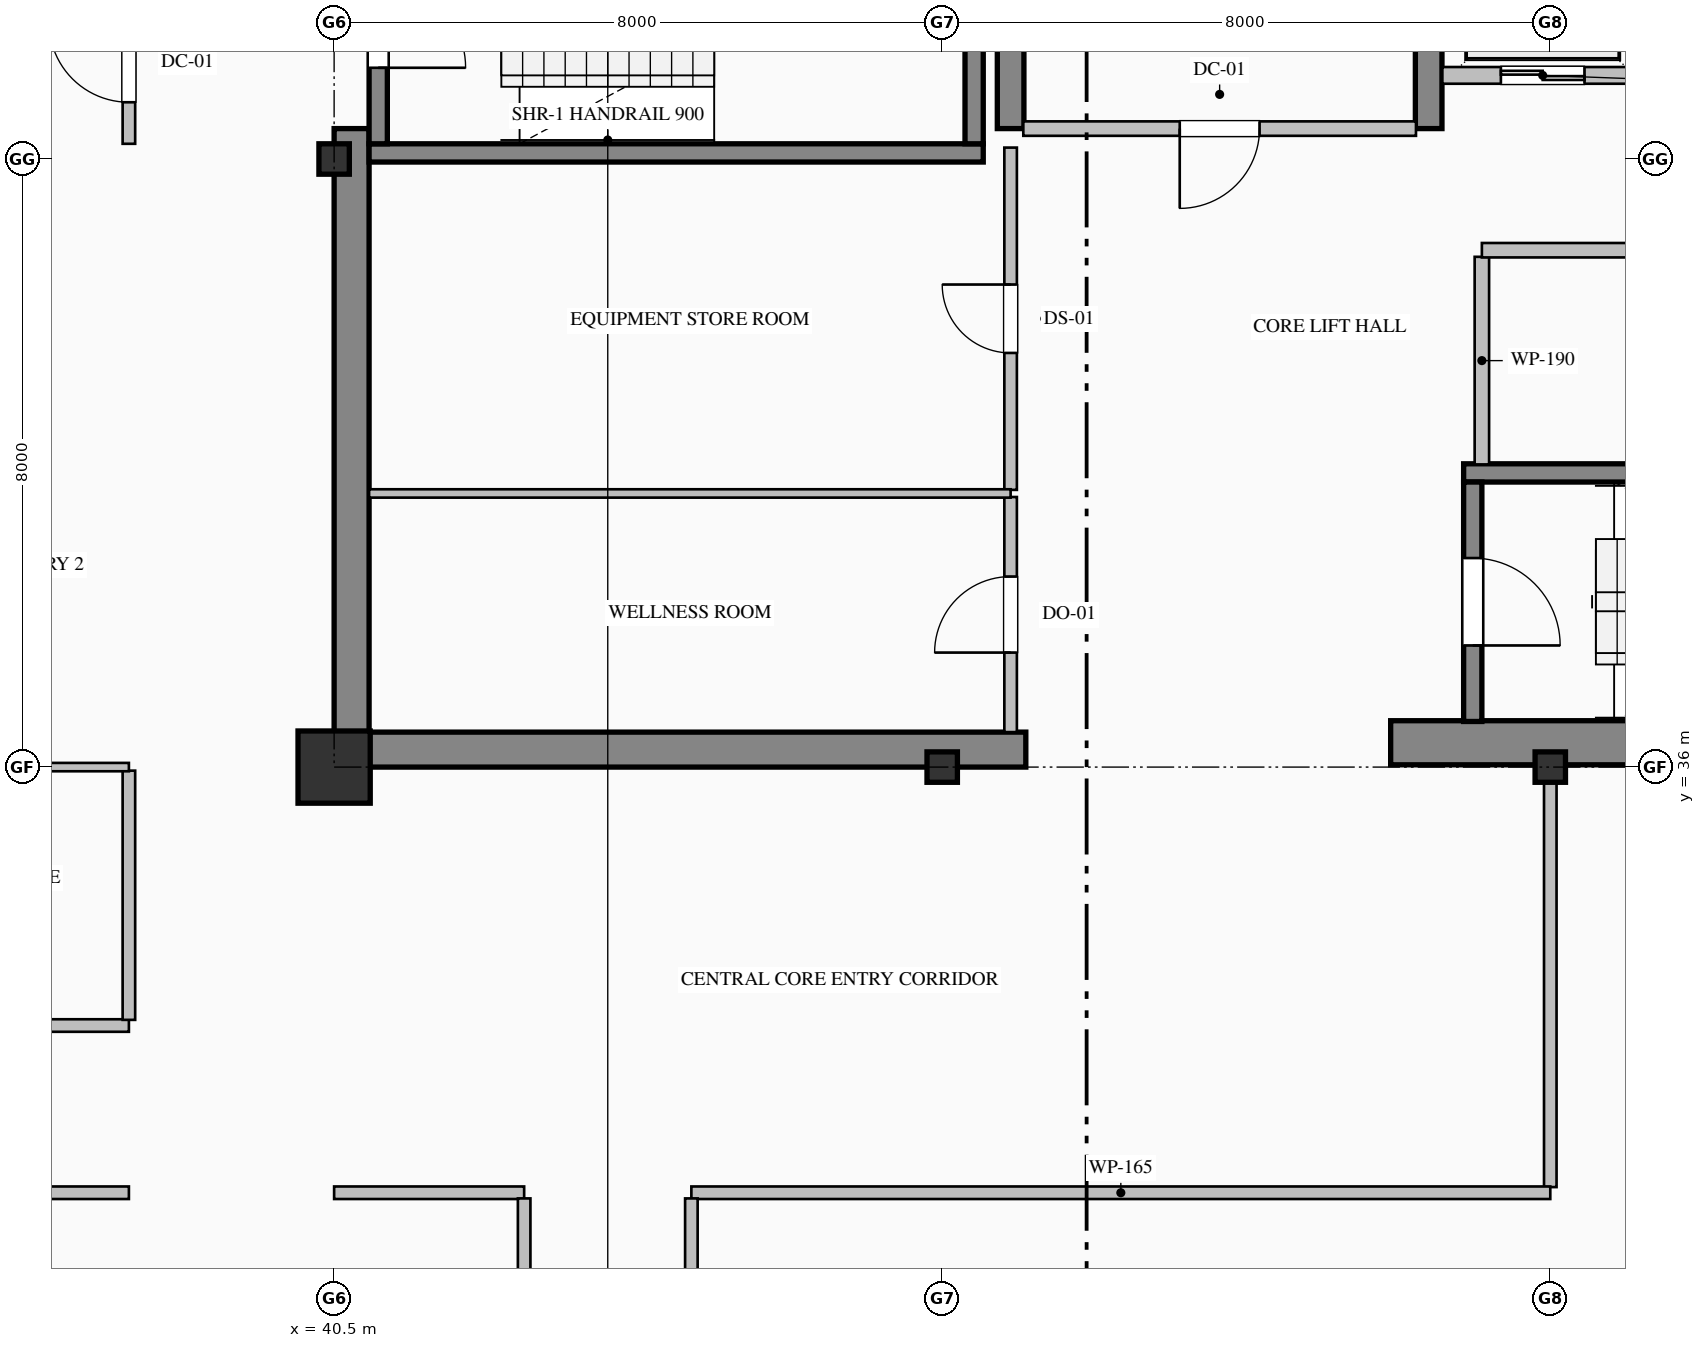
"""IFC4 building model, lengths in metres.
Left out: names, types, materials, properties, quantities, classifications, styles, units other than length and angle.
Written with IfcOpenShell. Run it as: python <this file> out.ifc"""

import sys

from ifc_helpers import new_model, si_unit, direction, frame, frame_2d, origin, origin_2d, place, context, subcontext, project, spatial, rectangle, hollow_rectangle, i_section, extrude, element, fill, save


model = new_model("IFC4")
c1 = context("Model", 3, precision=1e-05, world=origin(), true_north=direction((0.0, 1.0)))
c2 = subcontext(c1, "Body", "Model", "MODEL_VIEW")
j1 = project(units=[si_unit("LENGTHUNIT", "METRE"), si_unit("PLANEANGLEUNIT", "RADIAN")], contexts=[c1])
p1 = place(None, origin())
s1 = spatial("IfcSite", under=j1, at=p1, CompositionType="ELEMENT")
p2 = place(p1, origin())
s2 = spatial("IfcBuilding", under=s1, at=p2, CompositionType="ELEMENT")
p3 = place(p2, frame((0.0, 0.0, 221.8)))
s3 = spatial("IfcBuildingStorey", under=s2, at=p3, CompositionType="ELEMENT", Elevation=221.8)
p4 = place(p3, frame((40.73, 36.46, 0.0), z_axis=(0.0, 0.0, 1.0), x_axis=(0.0, 1.0, 0.0)))
e1 = element("IfcWall", 1, at=p4, inside=s3, PredefinedType="SHEAR", context=c2, shape_type="SweptSolid", body=[
    extrude(rectangle(XDim=7.94, YDim=0.46, at=frame_2d((3.97, 0.0))), origin(), (0.0, 0.0, 1.0), 3.775),
])
p5 = place(p3, frame((40.5, 36.23, 0.0), z_axis=(0.0, 0.0, 1.0), x_axis=(1.0, 0.0, 0.0)))
e2 = element("IfcWall", 2, at=p5, inside=s3, PredefinedType="SHEAR", context=c2, shape_type="SweptSolid", body=[
    extrude(rectangle(XDim=9.1, YDim=0.46, at=frame_2d((4.55, 0.0))), origin(), (0.0, 0.0, 1.0), 3.775),
])
p6 = place(p3, frame((54.4, 36.32, 0.0), z_axis=(0.0, 0.0, 1.0), x_axis=(1.0, 0.0, 0.0)))
e3 = element("IfcWall", 3, at=p6, inside=s3, PredefinedType="SHEAR", context=c2, shape_type="SweptSolid", body=[
    extrude(rectangle(XDim=9.6, YDim=0.58, at=frame_2d((4.8, 0.0))), origin(), (0.0, 0.0, 1.0), 4.0),
])
p7 = place(p3, frame((49.4, 44.4, 0.0), z_axis=(0.0, 0.0, 1.0), x_axis=(0.0, 1.0, 0.0)))
e4 = element("IfcWall", 4, at=p7, inside=s3, PredefinedType="SHEAR", context=c2, shape_type="SweptSolid", body=[
    extrude(rectangle(XDim=3.0, YDim=0.35, at=frame_2d((1.5, 0.0))), origin(), (0.0, 0.0, 1.0), 3.775),
])
p8 = place(p3, frame((54.9, 44.4, 0.0), z_axis=(0.0, 0.0, 1.0), x_axis=(0.0, 1.0, 0.0)))
e5 = element("IfcWall", 5, at=p8, inside=s3, PredefinedType="SHEAR", context=c2, shape_type="SweptSolid", body=[
    extrude(rectangle(XDim=7.14, YDim=0.35, at=frame_2d((3.57, 0.0))), origin(), (0.0, 0.0, 1.0), 3.775),
])
p9 = place(p3, frame((40.5, 36.0, 0.0), z_axis=(0.0, 0.0, 1.0), x_axis=(1.0, 0.0, 0.0)))
e6 = element("IfcColumn", 6, at=p9, inside=s3, PredefinedType="COLUMN", context=c2, shape_type="SweptSolid", body=[
    extrude(hollow_rectangle(XDim=0.95, YDim=0.95, WallThickness=0.036, at=origin_2d()), origin(), (0.0, 0.0, 1.0), 4.0),
])
for number, where, z_axis, x_axis in (
    (7, (40.5, 44.0, 0.0), (0.0, 0.0, 1.0), (1.0, 0.0, 0.0)),
    (8, (48.5, 36.0, 0.0), (0.0, 0.0, 1.0), (1.0, 0.0, 0.0)),
    (9, (56.5, 36.0, 0.0), (0.0, 0.0, 1.0), (1.0, 0.0, 0.0)),
):
    element("IfcColumn", number, at=place(p3, frame(where, z_axis=z_axis, x_axis=x_axis)), inside=s3, PredefinedType="COLUMN", context=c2, shape_type="SweptSolid", body=[
        extrude(i_section(OverallWidth=0.4, OverallDepth=0.4, WebThickness=0.013, FlangeThickness=0.021, FilletRadius=0.022, at=origin_2d()), origin(), (0.0, 0.0, 1.0), 4.0),
    ])
p10 = place(p3, frame((49.04, 44.08, 0.0), z_axis=(0.0, 0.0, 1.0), x_axis=(-1.0, 0.0, 0.0)))
e10 = element("IfcWall", 10, at=p10, inside=s3, PredefinedType="SOLIDWALL", context=c2, shape_type="SweptSolid", body=[
    extrude(rectangle(XDim=8.08, YDim=0.24, at=frame_2d((4.04, 0.0))), origin(), (0.0, 0.0, 1.0), 4.0),
])
p11 = place(p3, frame((41.08, 47.35, 0.0), z_axis=(0.0, 0.0, 1.0), x_axis=(0.0, -1.0, 0.0)))
e11 = element("IfcWall", 11, at=p11, inside=s3, PredefinedType="SOLIDWALL", context=c2, shape_type="SweptSolid", body=[
    extrude(rectangle(XDim=3.15, YDim=0.24, at=frame_2d((1.575, 0.0))), origin(), (0.0, 0.0, 1.0), 4.0),
])
p12 = place(p11, frame((1.0, 0.0, 0.0)))
e12 = element("IfcOpeningElement", 12, at=p12, cuts=e11, PredefinedType="OPENING", context=c2, shape_type="SweptSolid", body=[
    extrude(rectangle(XDim=1.15, YDim=2.2, at=frame_2d((0.575, 1.1))), frame((0.0, 0.13, 0.0), z_axis=(0.0, -1.0, 0.0), x_axis=(1.0, 0.0, 0.0)), (0.0, 0.0, 1.0), 0.26),
])
p13 = place(p3, frame((48.92, 44.2, 0.0), z_axis=(0.0, 0.0, 1.0), x_axis=(0.0, 1.0, 0.0)))
e13 = element("IfcWall", 13, at=p13, inside=s3, PredefinedType="SOLIDWALL", context=c2, shape_type="SweptSolid", body=[
    extrude(rectangle(XDim=3.15, YDim=0.24, at=frame_2d((1.575, 0.0))), origin(), (0.0, 0.0, 1.0), 4.0),
])
p14 = place(p3, frame((55.36, 39.87, 0.0), z_axis=(0.0, 0.0, 1.0), x_axis=(1.0, 0.0, 0.0)))
e14 = element("IfcWall", 14, at=p14, inside=s3, PredefinedType="SOLIDWALL", context=c2, shape_type="SweptSolid", body=[
    extrude(rectangle(XDim=8.08, YDim=0.24, at=frame_2d((4.04, 0.0))), origin(), (0.0, 0.0, 1.0), 4.0),
])
p15 = place(p3, frame((55.48, 39.75, 0.0), z_axis=(0.0, 0.0, 1.0), x_axis=(0.0, -1.0, 0.0)))
e15 = element("IfcWall", 15, at=p15, inside=s3, PredefinedType="SOLIDWALL", context=c2, shape_type="SweptSolid", body=[
    extrude(rectangle(XDim=3.15, YDim=0.24, at=frame_2d((1.575, 0.0))), origin(), (0.0, 0.0, 1.0), 4.0),
])
p16 = place(p15, frame((1.0, 0.0, 0.0)))
e16 = element("IfcOpeningElement", 16, at=p16, cuts=e15, PredefinedType="OPENING", context=c2, shape_type="SweptSolid", body=[
    extrude(rectangle(XDim=1.15, YDim=2.2, at=frame_2d((0.575, 1.1))), frame((0.0, 0.13, 0.0), z_axis=(0.0, -1.0, 0.0), x_axis=(1.0, 0.0, 0.0)), (0.0, 0.0, 1.0), 0.26),
])
p17 = place(p3, frame((63.32, 45.1, 0.0), z_axis=(0.0, 0.0, 1.0), x_axis=(-1.0, 0.0, 0.0)))
e17 = element("IfcWall", 17, at=p17, inside=s3, PredefinedType="PARTITIONING", context=c2, shape_type="SweptSolid", body=[
    extrude(rectangle(XDim=8.24, YDim=0.22, at=frame_2d((4.12, 0.0))), origin(), (0.0, 0.0, 1.0), 3.775),
])
p18 = place(p17, frame((6.37, 0.0, 0.0)))
e18 = element("IfcOpeningElement", 18, at=p18, cuts=e17, PredefinedType="OPENING", context=c2, shape_type="SweptSolid", body=[
    extrude(rectangle(XDim=1.1, YDim=2.2, at=frame_2d((0.55, 1.1))), frame((0.0, 0.12, 0.0), z_axis=(0.0, -1.0, 0.0), x_axis=(1.0, 0.0, 0.0)), (0.0, 0.0, 1.0), 0.24),
])
p19 = place(p17, frame((3.57, 0.0, 0.0)))
e19 = element("IfcOpeningElement", 19, at=p19, cuts=e17, PredefinedType="OPENING", context=c2, shape_type="SweptSolid", body=[
    extrude(rectangle(XDim=1.1, YDim=2.2, at=frame_2d((0.55, 1.1))), frame((0.0, 0.12, 0.0), z_axis=(0.0, -1.0, 0.0), x_axis=(1.0, 0.0, 0.0)), (0.0, 0.0, 1.0), 0.24),
])
p20 = place(p17, frame((0.77, 0.0, 0.0)))
e20 = element("IfcOpeningElement", 20, at=p20, cuts=e17, PredefinedType="OPENING", context=c2, shape_type="SweptSolid", body=[
    extrude(rectangle(XDim=1.1, YDim=2.2, at=frame_2d((0.55, 1.1))), frame((0.0, 0.12, 0.0), z_axis=(0.0, -1.0, 0.0), x_axis=(1.0, 0.0, 0.0)), (0.0, 0.0, 1.0), 0.24),
])
p21 = place(p3, frame((37.8, 44.2, 0.0), z_axis=(0.0, 0.0, 1.0), x_axis=(0.0, 1.0, 0.0)))
e21 = element("IfcWall", 21, at=p21, inside=s3, PredefinedType="PARTITIONING", context=c2, shape_type="SweptSolid", body=[
    extrude(rectangle(XDim=2.143, YDim=0.165, at=frame_2d((1.072, 0.0))), origin(), (0.0, 0.0, 1.0), 3.775),
])
p22 = place(p21, frame((0.546, 0.0, 0.0)))
e22 = element("IfcOpeningElement", 22, at=p22, cuts=e21, PredefinedType="OPENING", context=c2, shape_type="SweptSolid", body=[
    extrude(rectangle(XDim=1.05, YDim=2.15, at=frame_2d((0.525, 1.075))), frame((0.0, 0.093, 0.0), z_axis=(0.0, -1.0, 0.0), x_axis=(1.0, 0.0, 0.0)), (0.0, 0.0, 1.0), 0.185),
])
p23 = place(p3, frame((54.733, 44.4, 0.0), z_axis=(0.0, 0.0, 1.0), x_axis=(-1.0, 0.0, 0.0)))
e23 = element("IfcWall", 23, at=p23, inside=s3, PredefinedType="PARTITIONING", context=c2, shape_type="SweptSolid", body=[
    extrude(rectangle(XDim=5.166, YDim=0.19, at=frame_2d((2.583, 0.0))), origin(), (0.0, 0.0, 1.0), 3.775),
])
p24 = place(p23, frame((2.058, 0.0, 0.0)))
e24 = element("IfcOpeningElement", 24, at=p24, cuts=e23, PredefinedType="OPENING", context=c2, shape_type="SweptSolid", body=[
    extrude(rectangle(XDim=1.05, YDim=2.15, at=frame_2d((0.525, 1.075))), frame((0.0, 0.105, 0.0), z_axis=(0.0, -1.0, 0.0), x_axis=(1.0, 0.0, 0.0)), (0.0, 0.0, 1.0), 0.21),
])
p25 = place(p3, frame((49.4, 36.46, 0.0), z_axis=(0.0, 0.0, 1.0), x_axis=(0.0, 1.0, 0.0)))
e25 = element("IfcWall", 25, at=p25, inside=s3, PredefinedType="PARTITIONING", context=c2, shape_type="SweptSolid", body=[
    extrude(rectangle(XDim=3.093, YDim=0.165, at=frame_2d((1.546, 0.0))), origin(), (0.0, 0.0, 1.0), 3.017),
])
p26 = place(p25, frame((1.046, 0.0, 0.0)))
e26 = element("IfcOpeningElement", 26, at=p26, cuts=e25, PredefinedType="OPENING", context=c2, shape_type="SweptSolid", body=[
    extrude(rectangle(XDim=1.0, YDim=2.15, at=frame_2d((0.5, 1.075))), frame((0.0, 0.093, 0.0), z_axis=(0.0, -1.0, 0.0), x_axis=(1.0, 0.0, 0.0)), (0.0, 0.0, 1.0), 0.185),
])
p27 = place(p3, frame((49.4, 39.647, 0.0), z_axis=(0.0, 0.0, 1.0), x_axis=(0.0, 1.0, 0.0)))
e27 = element("IfcWall", 27, at=p27, inside=s3, PredefinedType="PARTITIONING", context=c2, shape_type="SweptSolid", body=[
    extrude(rectangle(XDim=4.503, YDim=0.165, at=frame_2d((2.251, 0.0))), origin(), (0.0, 0.0, 1.0), 3.017),
])
p28 = place(p27, frame((1.802, 0.0, 0.0)))
e28 = element("IfcOpeningElement", 28, at=p28, cuts=e27, PredefinedType="OPENING", context=c2, shape_type="SweptSolid", body=[
    extrude(rectangle(XDim=0.9, YDim=2.15, at=frame_2d((0.45, 1.075))), frame((0.0, 0.093, 0.0), z_axis=(0.0, -1.0, 0.0), x_axis=(1.0, 0.0, 0.0)), (0.0, 0.0, 1.0), 0.185),
])
p29 = place(p3, frame((55.6, 42.713, 0.0), z_axis=(0.0, 0.0, 1.0), x_axis=(0.0, -1.0, 0.0)))
e29 = element("IfcWall", 29, at=p29, inside=s3, PredefinedType="PARTITIONING", context=c2, shape_type="SweptSolid", body=[
    extrude(rectangle(XDim=2.731, YDim=0.19, at=frame_2d((1.365, 0.0))), origin(), (0.0, 0.0, 1.0), 3.775),
])
p30 = place(p3, frame((40.96, 39.6, 0.0), z_axis=(0.0, 0.0, 1.0), x_axis=(1.0, 0.0, 0.0)))
e30 = element("IfcWall", 30, at=p30, inside=s3, PredefinedType="MOVABLE", context=c2, shape_type="SweptSolid", body=[
    extrude(rectangle(XDim=8.44, YDim=0.11, at=frame_2d((4.22, 0.0))), origin(), (0.0, 0.0, 1.0), 3.775),
])
p31 = place(p3, frame((63.54, 42.8, 0.0), z_axis=(0.0, 0.0, 1.0), x_axis=(-1.0, 0.0, 0.0)))
e31 = element("IfcWall", 31, at=p31, inside=s3, PredefinedType="PARTITIONING", context=c2, shape_type="SweptSolid", body=[
    extrude(rectangle(XDim=7.94, YDim=0.19, at=frame_2d((3.97, 0.0))), origin(), (0.0, 0.0, 1.0), 3.775),
])
p32 = place(p31, frame((3.27, 0.0, 0.0)))
e32 = element("IfcOpeningElement", 32, at=p32, cuts=e31, PredefinedType="OPENING", context=c2, shape_type="SweptSolid", body=[
    extrude(rectangle(XDim=1.4, YDim=2.25, at=frame_2d((0.7, 1.125))), frame((0.0, 0.105, 0.0), z_axis=(0.0, -1.0, 0.0), x_axis=(1.0, 0.0, 0.0)), (0.0, 0.0, 1.0), 0.21),
])
p33 = place(p3, frame((37.8, 30.4, 0.0), z_axis=(0.0, 0.0, 1.0), x_axis=(-1.0, 0.0, 0.0)))
e33 = element("IfcWall", 33, at=p33, inside=s3, PredefinedType="PARTITIONING", context=c2, shape_type="SweptSolid", body=[
    extrude(rectangle(XDim=21.3, YDim=0.165, at=frame_2d((10.65, 0.0))), origin(), (0.0, 0.0, 1.0), 3.775),
])
p34 = place(p33, frame((10.15, 0.0, 0.0)))
e34 = element("IfcOpeningElement", 34, at=p34, cuts=e33, PredefinedType="OPENING", context=c2, shape_type="SweptSolid", body=[
    extrude(rectangle(XDim=1.0, YDim=2.15, at=frame_2d((0.5, 1.075))), frame((0.0, 0.093, 0.0), z_axis=(0.0, -1.0, 0.0), x_axis=(1.0, 0.0, 0.0)), (0.0, 0.0, 1.0), 0.185),
])
p35 = place(p3, frame((29.6, 32.6, 0.0), z_axis=(0.0, 0.0, 1.0), x_axis=(1.0, 0.0, 0.0)))
e35 = element("IfcWall", 35, at=p35, inside=s3, PredefinedType="PARTITIONING", context=c2, shape_type="SweptSolid", body=[
    extrude(rectangle(XDim=8.2, YDim=0.165, at=frame_2d((4.1, 0.0))), origin(), (0.0, 0.0, 1.0), 3.775),
])
p36 = place(p35, frame((3.6, 0.0, 0.0)))
e36 = element("IfcOpeningElement", 36, at=p36, cuts=e35, PredefinedType="OPENING", context=c2, shape_type="SweptSolid", body=[
    extrude(rectangle(XDim=1.0, YDim=2.15, at=frame_2d((0.5, 1.075))), frame((0.0, 0.093, 0.0), z_axis=(0.0, -1.0, 0.0), x_axis=(1.0, 0.0, 0.0)), (0.0, 0.0, 1.0), 0.185),
])
p37 = place(p3, frame((56.5, 36.0, 0.0), z_axis=(0.0, 0.0, 1.0), x_axis=(0.0, -1.0, 0.0)))
e37 = element("IfcWall", 37, at=p37, inside=s3, PredefinedType="PARTITIONING", context=c2, shape_type="SweptSolid", body=[
    extrude(rectangle(XDim=5.525, YDim=0.165, at=frame_2d((2.763, 0.0))), origin(), (0.0, 0.0, 1.0), 3.179),
])
p38 = place(p3, frame((56.5, 30.4, 0.0), z_axis=(0.0, 0.0, 1.0), x_axis=(-1.0, 0.0, 0.0)))
e38 = element("IfcWall", 38, at=p38, inside=s3, PredefinedType="PARTITIONING", context=c2, shape_type="SweptSolid", body=[
    extrude(rectangle(XDim=11.3, YDim=0.165, at=frame_2d((5.65, 0.0))), origin(), (0.0, 0.0, 1.0), 3.775),
])
p39 = place(p3, frame((37.8, 32.675, 0.0), z_axis=(0.0, 0.0, 1.0), x_axis=(0.0, 1.0, 0.0)))
e39 = element("IfcWall", 39, at=p39, inside=s3, PredefinedType="PARTITIONING", context=c2, shape_type="SweptSolid", body=[
    extrude(rectangle(XDim=3.278, YDim=0.165, at=frame_2d((1.639, 0.0))), origin(), (0.0, 0.0, 1.0), 3.775),
])
p40 = place(p3, frame((43.0, 30.4, 0.0), z_axis=(0.0, 0.0, 1.0), x_axis=(-1.0, 0.0, 0.0)))
e40 = element("IfcWall", 40, at=p40, inside=s3, PredefinedType="PARTITIONING", context=c2, shape_type="SweptSolid", body=[
    extrude(rectangle(XDim=2.5, YDim=0.165, at=frame_2d((1.25, 0.0))), origin(), (0.0, 0.0, 1.0), 3.775),
])
p41 = place(p3, frame((45.2, 30.325, 0.0), z_axis=(0.0, 0.0, 1.0), x_axis=(0.0, -1.0, 0.0)))
e41 = element("IfcWall", 41, at=p41, inside=s3, PredefinedType="PARTITIONING", context=c2, shape_type="SweptSolid", body=[
    extrude(rectangle(XDim=6.851, YDim=0.165, at=frame_2d((3.425, 0.0))), origin(), (0.0, 0.0, 1.0), 3.775),
])
p42 = place(p3, frame((43.0, 21.274, 0.0), z_axis=(0.0, 0.0, 1.0), x_axis=(0.0, 1.0, 0.0)))
e42 = element("IfcWall", 42, at=p42, inside=s3, PredefinedType="PARTITIONING", context=c2, shape_type="SweptSolid", body=[
    extrude(rectangle(XDim=9.051, YDim=0.165, at=frame_2d((4.525, 0.0))), origin(), (0.0, 0.0, 1.0), 3.775),
])
p43 = place(p42, frame((3.976, 0.0, 0.0)))
e43 = element("IfcOpeningElement", 43, at=p43, cuts=e42, PredefinedType="OPENING", context=c2, shape_type="SweptSolid", body=[
    extrude(rectangle(XDim=1.1, YDim=2.2, at=frame_2d((0.55, 1.1))), frame((0.0, 0.093, 0.0), z_axis=(0.0, -1.0, 0.0), x_axis=(1.0, 0.0, 0.0)), (0.0, 0.0, 1.0), 0.185),
])
p44 = place(p3, frame((29.6, 36.0, 0.0), z_axis=(0.0, 0.0, 1.0), x_axis=(1.0, 0.0, 0.0)))
e44 = element("IfcWall", 44, at=p44, inside=s3, PredefinedType="MOVABLE", context=c2, shape_type="SweptSolid", body=[
    extrude(rectangle(XDim=8.2, YDim=0.11, at=frame_2d((4.1, 0.0))), origin(), (0.0, 0.0, 1.0), 3.179),
])
p45 = place(p12, origin())
e45 = element("IfcDoor", 45, at=p45, inside=s3, OperationType="SINGLE_SWING_RIGHT", PredefinedType="DOOR", context=c2, shape_type="SweptSolid", body=[
    extrude(rectangle(XDim=1.15, YDim=2.2, at=frame_2d((0.575, 1.1))), frame((0.0, 0.025, 0.0), z_axis=(0.0, -1.0, 0.0), x_axis=(1.0, 0.0, 0.0)), (0.0, 0.0, 1.0), 0.05),
])
fill(e12, e45)
p46 = place(p16, origin())
e46 = element("IfcDoor", 46, at=p46, inside=s3, OperationType="SINGLE_SWING_RIGHT", PredefinedType="DOOR", context=c2, shape_type="SweptSolid", body=[
    extrude(rectangle(XDim=1.15, YDim=2.2, at=frame_2d((0.575, 1.1))), frame((0.0, 0.025, 0.0), z_axis=(0.0, -1.0, 0.0), x_axis=(1.0, 0.0, 0.0)), (0.0, 0.0, 1.0), 0.05),
])
fill(e16, e46)
p47 = place(p18, origin())
e47 = element("IfcDoor", 47, at=p47, inside=s3, OperationType="DOUBLE_DOOR_SLIDING", PredefinedType="DOOR", context=c2, shape_type="SweptSolid", body=[
    extrude(rectangle(XDim=1.1, YDim=2.2, at=frame_2d((0.55, 1.1))), frame((0.0, 0.025, 0.0), z_axis=(0.0, -1.0, 0.0), x_axis=(1.0, 0.0, 0.0)), (0.0, 0.0, 1.0), 0.05),
])
fill(e18, e47)
p48 = place(p24, origin())
e48 = element("IfcDoor", 48, at=p48, inside=s3, OperationType="SINGLE_SWING_RIGHT", PredefinedType="DOOR", context=c2, shape_type="SweptSolid", body=[
    extrude(rectangle(XDim=1.05, YDim=2.15, at=frame_2d((0.525, 1.075))), frame((0.0, 0.025, 0.0), z_axis=(0.0, -1.0, 0.0), x_axis=(1.0, 0.0, 0.0)), (0.0, 0.0, 1.0), 0.05),
])
fill(e24, e48)
p49 = place(p22, origin())
e49 = element("IfcDoor", 49, at=p49, inside=s3, OperationType="SINGLE_SWING_RIGHT", PredefinedType="DOOR", context=c2, shape_type="SweptSolid", body=[
    extrude(rectangle(XDim=1.05, YDim=2.15, at=frame_2d((0.525, 1.075))), frame((0.0, 0.025, 0.0), z_axis=(0.0, -1.0, 0.0), x_axis=(1.0, 0.0, 0.0)), (0.0, 0.0, 1.0), 0.05),
])
fill(e22, e49)
p50 = place(p26, origin())
e50 = element("IfcDoor", 50, at=p50, inside=s3, OperationType="SINGLE_SWING_LEFT", PredefinedType="DOOR", context=c2, shape_type="SweptSolid", body=[
    extrude(rectangle(XDim=1.0, YDim=2.15, at=frame_2d((0.5, 1.075))), frame((0.0, 0.025, 0.0), z_axis=(0.0, -1.0, 0.0), x_axis=(1.0, 0.0, 0.0)), (0.0, 0.0, 1.0), 0.05),
])
fill(e26, e50)
p51 = place(p28, origin())
e51 = element("IfcDoor", 51, at=p51, inside=s3, OperationType="SINGLE_SWING_RIGHT", PredefinedType="DOOR", context=c2, shape_type="SweptSolid", body=[
    extrude(rectangle(XDim=0.9, YDim=2.15, at=frame_2d((0.45, 1.075))), frame((0.0, 0.025, 0.0), z_axis=(0.0, -1.0, 0.0), x_axis=(1.0, 0.0, 0.0)), (0.0, 0.0, 1.0), 0.05),
])
fill(e28, e51)
save(model, sys.argv[1])
